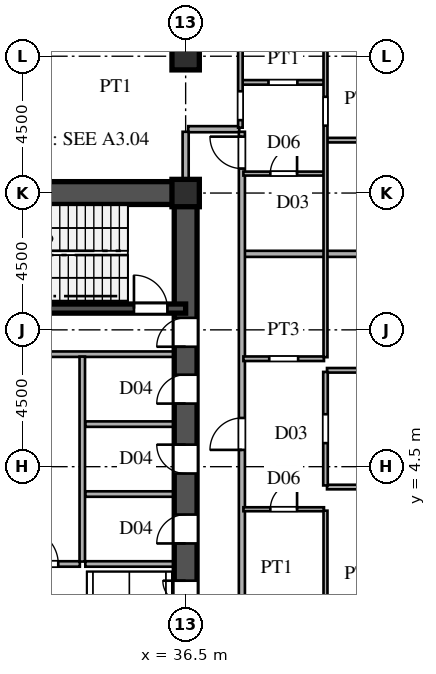
"""IFC4 building model, lengths in metres.
Left out: names, types, materials, properties, quantities, classifications, styles, units other than length and angle.
Written with IfcOpenShell. Run it as: python <this file> out.ifc"""

import sys

from ifc_helpers import new_model, si_unit, direction, frame, frame_2d, origin, origin_2d, place, context, subcontext, project, spatial, rectangle, i_section, extrude, source, transform, mapped, element, fill, save


model = new_model("IFC4")
c1 = context("Model", 3, precision=1e-05, world=origin(), true_north=direction((0.0, 1.0)))
c2 = subcontext(c1, "Body", "Model", "MODEL_VIEW")
j1 = project(units=[si_unit("LENGTHUNIT", "METRE"), si_unit("PLANEANGLEUNIT", "RADIAN")], contexts=[c1])
p1 = place(None, origin())
s1 = spatial("IfcSite", under=j1, at=p1, CompositionType="ELEMENT")
p2 = place(p1, origin())
s2 = spatial("IfcBuilding", under=s1, at=p2, CompositionType="ELEMENT")
p3 = place(p2, frame((0.0, 0.0, 36.9)))
s3 = spatial("IfcBuildingStorey", under=s2, at=p3, CompositionType="ELEMENT", Elevation=36.9)
m1 = source(origin(), c2, "Body", "SweptSolid", [
    extrude(i_section(OverallWidth=0.9, OverallDepth=0.9, WebThickness=0.036, FlangeThickness=0.055, at=origin_2d()), origin(), (0.0, 0.0, 1.0), 3.6),
])
for number, where, z_axis, x_axis in (
    (1, (36.5, 13.5, 0.0), (0.0, 0.0, 1.0), (1.0, 0.0, 0.0)),
    (2, (36.5, 18.0, 0.0), (0.0, 0.0, 1.0), (1.0, 0.0, 0.0)),
):
    element("IfcColumn", number, at=place(p3, frame(where, z_axis=z_axis, x_axis=x_axis)), inside=s3, PredefinedType="COLUMN", context=c2, shape_type="MappedRepresentation", body=[
        mapped(m1, transform((0.0, 0.0, 0.0), scale=1.0)),
    ])
p4 = place(p3, frame((27.5, 13.5, 0.0), z_axis=(0.0, 0.0, 1.0), x_axis=(1.0, 0.0, 0.0)))
e3 = element("IfcWall", 3, at=p4, inside=s3, PredefinedType="SHEAR", context=c2, shape_type="SweptSolid", body=[
    extrude(rectangle(XDim=9.0, YDim=0.75, at=frame_2d((4.5, 0.0))), origin(), (0.0, 0.0, 1.0), 3.38),
])
p5 = place(p3, frame((36.5, -1.3, 0.0), z_axis=(0.0, 0.0, 1.0), x_axis=(0.0, 1.0, 0.0)))
e4 = element("IfcWall", 4, at=p5, inside=s3, PredefinedType="SHEAR", context=c2, shape_type="SweptSolid", body=[
    extrude(rectangle(XDim=2.6, YDim=0.75, at=frame_2d((1.3, 0.0))), origin(), (0.0, 0.0, 1.0), 3.38),
])
p6 = place(p5, frame((0.55, 0.0, 0.0)))
e5 = element("IfcOpeningElement", 5, at=p6, cuts=e4, PredefinedType="OPENING", context=c2, shape_type="SweptSolid", body=[
    extrude(rectangle(XDim=1.5, YDim=2.3, at=frame_2d((0.75, 1.15))), frame((0.0, 0.385, 0.0), z_axis=(0.0, -1.0, 0.0), x_axis=(1.0, 0.0, 0.0)), (0.0, 0.0, 1.0), 0.77),
])
p7 = place(p3, frame((36.5, 8.2, 0.0), z_axis=(0.0, 0.0, 1.0), x_axis=(0.0, 1.0, 0.0)))
e6 = element("IfcWall", 6, at=p7, inside=s3, PredefinedType="SHEAR", context=c2, shape_type="SweptSolid", body=[
    extrude(rectangle(XDim=5.45, YDim=0.75, at=frame_2d((2.725, 0.0))), origin(), (0.0, 0.0, 1.0), 3.38),
])
p8 = place(p7, frame((0.245, 0.0, 0.0)))
e7 = element("IfcOpeningElement", 7, at=p8, cuts=e6, PredefinedType="OPENING", context=c2, shape_type="SweptSolid", body=[
    extrude(rectangle(XDim=0.95, YDim=2.15, at=frame_2d((0.475, 1.075))), frame((0.0, 0.385, 0.0), z_axis=(0.0, -1.0, 0.0), x_axis=(1.0, 0.0, 0.0)), (0.0, 0.0, 1.0), 0.77),
])
p9 = place(p3, frame((36.5, 1.3, 0.0), z_axis=(0.0, 0.0, 1.0), x_axis=(0.0, 1.0, 0.0)))
e8 = element("IfcWall", 8, at=p9, inside=s3, PredefinedType="SHEAR", context=c2, shape_type="SweptSolid", body=[
    extrude(rectangle(XDim=2.3, YDim=0.75, at=frame_2d((1.15, 0.0))), origin(), (0.0, 0.0, 1.0), 3.38),
])
p10 = place(p9, frame((0.675, 0.0, 0.0)))
e9 = element("IfcOpeningElement", 9, at=p10, cuts=e8, PredefinedType="OPENING", context=c2, shape_type="SweptSolid", body=[
    extrude(rectangle(XDim=0.95, YDim=2.15, at=frame_2d((0.475, 1.075))), frame((0.0, 0.385, 0.0), z_axis=(0.0, -1.0, 0.0), x_axis=(1.0, 0.0, 0.0)), (0.0, 0.0, 1.0), 0.77),
])
p11 = place(p3, frame((36.5, 3.6, 0.0), z_axis=(0.0, 0.0, 1.0), x_axis=(0.0, 1.0, 0.0)))
e10 = element("IfcWall", 10, at=p11, inside=s3, PredefinedType="SHEAR", context=c2, shape_type="SweptSolid", body=[
    extrude(rectangle(XDim=2.3, YDim=0.75, at=frame_2d((1.15, 0.0))), origin(), (0.0, 0.0, 1.0), 3.38),
])
p12 = place(p11, frame((0.675, 0.0, 0.0)))
e11 = element("IfcOpeningElement", 11, at=p12, cuts=e10, PredefinedType="OPENING", context=c2, shape_type="SweptSolid", body=[
    extrude(rectangle(XDim=0.95, YDim=2.15, at=frame_2d((0.475, 1.075))), frame((0.0, 0.385, 0.0), z_axis=(0.0, -1.0, 0.0), x_axis=(1.0, 0.0, 0.0)), (0.0, 0.0, 1.0), 0.77),
])
p13 = place(p3, frame((36.5, 5.9, 0.0), z_axis=(0.0, 0.0, 1.0), x_axis=(0.0, 1.0, 0.0)))
e12 = element("IfcWall", 12, at=p13, inside=s3, PredefinedType="SHEAR", context=c2, shape_type="SweptSolid", body=[
    extrude(rectangle(XDim=2.3, YDim=0.75, at=frame_2d((1.15, 0.0))), origin(), (0.0, 0.0, 1.0), 3.38),
])
p14 = place(p13, frame((0.675, 0.0, 0.0)))
e13 = element("IfcOpeningElement", 13, at=p14, cuts=e12, PredefinedType="OPENING", context=c2, shape_type="SweptSolid", body=[
    extrude(rectangle(XDim=0.95, YDim=2.15, at=frame_2d((0.475, 1.075))), frame((0.0, 0.385, 0.0), z_axis=(0.0, -1.0, 0.0), x_axis=(1.0, 0.0, 0.0)), (0.0, 0.0, 1.0), 0.77),
])
p15 = place(p3, frame((27.5, 9.7, 0.0), z_axis=(0.0, 0.0, 1.0), x_axis=(1.0, 0.0, 0.0)))
e14 = element("IfcWall", 14, at=p15, inside=s3, PredefinedType="SHEAR", context=c2, shape_type="SweptSolid", body=[
    extrude(rectangle(XDim=9.0, YDim=0.3, at=frame_2d((4.5, 0.0))), origin(), (0.0, 0.0, 1.0), 3.38),
])
p16 = place(p15, frame((7.3, 0.0, 0.0)))
e15 = element("IfcOpeningElement", 15, at=p16, cuts=e14, PredefinedType="OPENING", context=c2, shape_type="SweptSolid", body=[
    extrude(rectangle(XDim=1.1, YDim=2.2, at=frame_2d((0.55, 1.1))), frame((0.0, 0.16, 0.0), z_axis=(0.0, -1.0, 0.0), x_axis=(1.0, 0.0, 0.0)), (0.0, 0.0, 1.0), 0.32),
])
p17 = place(p3, frame((30.45, 8.2, 0.0), z_axis=(0.0, 0.0, 1.0), x_axis=(1.0, 0.0, 0.0)))
e16 = element("IfcWall", 16, at=p17, inside=s3, PredefinedType="PARTITIONING", context=c2, shape_type="SweptSolid", body=[
    extrude(rectangle(XDim=5.7, YDim=0.18, at=frame_2d((2.85, 0.0))), origin(), (0.0, 0.0, 1.0), 3.38),
])
p18 = place(p3, frame((33.1, 1.38, 0.0), z_axis=(0.0, 0.0, 1.0), x_axis=(0.0, 1.0, 0.0)))
e17 = element("IfcWall", 17, at=p18, inside=s3, PredefinedType="PARTITIONING", context=c2, shape_type="SweptSolid", body=[
    extrude(rectangle(XDim=6.74, YDim=0.18, at=frame_2d((3.37, 0.0))), origin(), (0.0, 0.0, 1.0), 3.38),
])
p19 = place(p3, frame((30.45, 1.3, 0.0), z_axis=(0.0, 0.0, 1.0), x_axis=(1.0, 0.0, 0.0)))
e18 = element("IfcWall", 18, at=p19, inside=s3, PredefinedType="PARTITIONING", context=c2, shape_type="SweptSolid", body=[
    extrude(rectangle(XDim=2.57, YDim=0.18, at=frame_2d((1.285, 0.0))), origin(), (0.0, 0.0, 1.0), 3.38),
])
p20 = place(p19, frame((0.71, 0.0, 0.0)))
e19 = element("IfcOpeningElement", 19, at=p20, cuts=e18, PredefinedType="OPENING", context=c2, shape_type="SweptSolid", body=[
    extrude(rectangle(XDim=1.15, YDim=2.2, at=frame_2d((0.575, 1.1))), frame((0.0, 0.1, 0.0), z_axis=(0.0, -1.0, 0.0), x_axis=(1.0, 0.0, 0.0)), (0.0, 0.0, 1.0), 0.2),
])
for number, where, z_axis, x_axis in (
    (20, (33.2, 1.3, 0.0), (0.0, 0.0, 1.0), (1.0, 0.0, 0.0)),
    (21, (33.2, 3.6, 0.0), (0.0, 0.0, 1.0), (1.0, 0.0, 0.0)),
    (22, (33.2, 5.9, 0.0), (0.0, 0.0, 1.0), (1.0, 0.0, 0.0)),
):
    element("IfcWall", number, at=place(p3, frame(where, z_axis=z_axis, x_axis=x_axis)), inside=s3, PredefinedType="PARTITIONING", context=c2, shape_type="SweptSolid", body=[
        extrude(rectangle(XDim=2.95, YDim=0.18, at=frame_2d((1.475, 0.0))), origin(), (0.0, 0.0, 1.0), 3.38),
    ])
p21 = place(p3, frame((38.4, 3.1, 0.0), z_axis=(0.0, 0.0, 1.0), x_axis=(1.0, 0.0, 0.0)))
e23 = element("IfcWall", 23, at=p21, inside=s3, PredefinedType="PARTITIONING", context=c2, shape_type="SweptSolid", body=[
    extrude(rectangle(XDim=2.65, YDim=0.13, at=frame_2d((1.325, 0.0))), origin(), (0.0, 0.0, 1.0), 3.38),
])
p22 = place(p21, frame((0.885, 0.0, 0.0)))
e24 = element("IfcOpeningElement", 24, at=p22, cuts=e23, PredefinedType="OPENING", context=c2, shape_type="SweptSolid", body=[
    extrude(rectangle(XDim=0.88, YDim=2.1, at=frame_2d((0.44, 1.05))), frame((0.0, 0.075, 0.0), z_axis=(0.0, -1.0, 0.0), x_axis=(1.0, 0.0, 0.0)), (0.0, 0.0, 1.0), 0.15),
])
p23 = place(p3, frame((41.15, 3.83, 0.0), z_axis=(0.0, 0.0, 1.0), x_axis=(1.0, 0.0, 0.0)))
e25 = element("IfcWall", 25, at=p23, inside=s3, PredefinedType="PARTITIONING", context=c2, shape_type="SweptSolid", body=[
    extrude(rectangle(XDim=31.385, YDim=0.15, at=frame_2d((15.692, 0.0))), origin(), (0.0, 0.0, 1.0), 3.38),
])
p24 = place(p23, frame((6.175, 0.0, 0.0)))
e26 = element("IfcOpeningElement", 26, at=p24, cuts=e25, PredefinedType="OPENING", context=c2, shape_type="SweptSolid", body=[
    extrude(rectangle(XDim=0.95, YDim=2.15, at=frame_2d((0.475, 1.075))), frame((0.0, 0.085, 0.0), z_axis=(0.0, -1.0, 0.0), x_axis=(1.0, 0.0, 0.0)), (0.0, 0.0, 1.0), 0.17),
])
p25 = place(p23, frame((15.725, 0.0, 0.0)))
e27 = element("IfcOpeningElement", 27, at=p25, cuts=e25, PredefinedType="OPENING", context=c2, shape_type="SweptSolid", body=[
    extrude(rectangle(XDim=0.95, YDim=2.15, at=frame_2d((0.475, 1.075))), frame((0.0, 0.085, 0.0), z_axis=(0.0, -1.0, 0.0), x_axis=(1.0, 0.0, 0.0)), (0.0, 0.0, 1.0), 0.17),
])
p26 = place(p3, frame((41.15, 7.67, 0.0), z_axis=(0.0, 0.0, 1.0), x_axis=(1.0, 0.0, 0.0)))
e28 = element("IfcWall", 28, at=p26, inside=s3, PredefinedType="PARTITIONING", context=c2, shape_type="SweptSolid", body=[
    extrude(rectangle(XDim=31.385, YDim=0.15, at=frame_2d((15.692, 0.0))), origin(), (0.0, 0.0, 1.0), 3.38),
])
p27 = place(p26, frame((6.175, 0.0, 0.0)))
e29 = element("IfcOpeningElement", 29, at=p27, cuts=e28, PredefinedType="OPENING", context=c2, shape_type="SweptSolid", body=[
    extrude(rectangle(XDim=0.95, YDim=2.15, at=frame_2d((0.475, 1.075))), frame((0.0, 0.085, 0.0), z_axis=(0.0, -1.0, 0.0), x_axis=(1.0, 0.0, 0.0)), (0.0, 0.0, 1.0), 0.17),
])
p28 = place(p26, frame((15.725, 0.0, 0.0)))
e30 = element("IfcOpeningElement", 30, at=p28, cuts=e28, PredefinedType="OPENING", context=c2, shape_type="SweptSolid", body=[
    extrude(rectangle(XDim=0.95, YDim=2.15, at=frame_2d((0.475, 1.075))), frame((0.0, 0.085, 0.0), z_axis=(0.0, -1.0, 0.0), x_axis=(1.0, 0.0, 0.0)), (0.0, 0.0, 1.0), 0.17),
])
p29 = place(p3, frame((38.4, 8.05, 0.0), z_axis=(0.0, 0.0, 1.0), x_axis=(1.0, 0.0, 0.0)))
e31 = element("IfcWall", 31, at=p29, inside=s3, PredefinedType="PARTITIONING", context=c2, shape_type="SweptSolid", body=[
    extrude(rectangle(XDim=2.65, YDim=0.15, at=frame_2d((1.325, 0.0))), origin(), (0.0, 0.0, 1.0), 3.38),
])
p30 = place(p29, frame((0.85, 0.0, 0.0)))
e32 = element("IfcOpeningElement", 32, at=p30, cuts=e31, PredefinedType="OPENING", context=c2, shape_type="SweptSolid", body=[
    extrude(rectangle(XDim=0.95, YDim=2.15, at=frame_2d((0.475, 1.075))), frame((0.0, 0.085, 0.0), z_axis=(0.0, -1.0, 0.0), x_axis=(1.0, 0.0, 0.0)), (0.0, 0.0, 1.0), 0.17),
])
p31 = place(p3, frame((38.43, 11.5, 0.0), z_axis=(0.0, 0.0, 1.0), x_axis=(1.0, 0.0, 0.0)))
e33 = element("IfcWall", 33, at=p31, inside=s3, PredefinedType="PARTITIONING", context=c2, shape_type="SweptSolid", body=[
    extrude(rectangle(XDim=30.377, YDim=0.2, at=frame_2d((15.188, 0.0))), origin(), (0.0, 0.0, 1.0), 3.38),
])
p32 = place(p3, frame((38.4, 14.14, 0.0), z_axis=(0.0, 0.0, 1.0), x_axis=(1.0, 0.0, 0.0)))
e34 = element("IfcWall", 34, at=p32, inside=s3, PredefinedType="PARTITIONING", context=c2, shape_type="SweptSolid", body=[
    extrude(rectangle(XDim=2.65, YDim=0.13, at=frame_2d((1.325, 0.0))), origin(), (0.0, 0.0, 1.0), 3.38),
])
p33 = place(p32, frame((0.885, 0.0, 0.0)))
e35 = element("IfcOpeningElement", 35, at=p33, cuts=e34, PredefinedType="OPENING", context=c2, shape_type="SweptSolid", body=[
    extrude(rectangle(XDim=0.88, YDim=2.1, at=frame_2d((0.44, 1.05))), frame((0.0, 0.075, 0.0), z_axis=(0.0, -1.0, 0.0), x_axis=(1.0, 0.0, 0.0)), (0.0, 0.0, 1.0), 0.15),
])
p34 = place(p3, frame((41.15, 15.24, 0.0), z_axis=(0.0, 0.0, 1.0), x_axis=(1.0, 0.0, 0.0)))
e36 = element("IfcWall", 36, at=p34, inside=s3, PredefinedType="PARTITIONING", context=c2, shape_type="SweptSolid", body=[
    extrude(rectangle(XDim=13.3, YDim=0.15, at=frame_2d((6.65, 0.0))), origin(), (0.0, 0.0, 1.0), 3.38),
])
p35 = place(p34, frame((6.175, 0.0, 0.0)))
e37 = element("IfcOpeningElement", 37, at=p35, cuts=e36, PredefinedType="OPENING", context=c2, shape_type="SweptSolid", body=[
    extrude(rectangle(XDim=0.95, YDim=2.15, at=frame_2d((0.475, 1.075))), frame((0.0, 0.085, 0.0), z_axis=(0.0, -1.0, 0.0), x_axis=(1.0, 0.0, 0.0)), (0.0, 0.0, 1.0), 0.17),
])
p36 = place(p3, frame((36.585, 15.6, 0.0), z_axis=(0.0, 0.0, 1.0), x_axis=(1.0, 0.0, 0.0)))
e38 = element("IfcWall", 38, at=p36, inside=s3, PredefinedType="PARTITIONING", context=c2, shape_type="SweptSolid", body=[
    extrude(rectangle(XDim=1.68, YDim=0.2, at=frame_2d((0.84, 0.0))), origin(), (0.0, 0.0, 1.0), 3.38),
])
p37 = place(p3, frame((38.35, 17.14, 0.0), z_axis=(0.0, 0.0, 1.0), x_axis=(1.0, 0.0, 0.0)))
e39 = element("IfcWall", 39, at=p37, inside=s3, PredefinedType="PARTITIONING", context=c2, shape_type="SweptSolid", body=[
    extrude(rectangle(XDim=2.7, YDim=0.15, at=frame_2d((1.35, 0.0))), origin(), (0.0, 0.0, 1.0), 3.38),
])
p38 = place(p37, frame((0.875, 0.0, 0.0)))
e40 = element("IfcOpeningElement", 40, at=p38, cuts=e39, PredefinedType="OPENING", context=c2, shape_type="SweptSolid", body=[
    extrude(rectangle(XDim=0.95, YDim=2.15, at=frame_2d((0.475, 1.075))), frame((0.0, 0.085, 0.0), z_axis=(0.0, -1.0, 0.0), x_axis=(1.0, 0.0, 0.0)), (0.0, 0.0, 1.0), 0.17),
])
p39 = place(p3, frame((36.5, 13.88, 0.0), z_axis=(0.0, 0.0, 1.0), x_axis=(0.0, 1.0, 0.0)))
e41 = element("IfcWall", 41, at=p39, inside=s3, PredefinedType="PARTITIONING", context=c2, shape_type="SweptSolid", body=[
    extrude(rectangle(XDim=1.635, YDim=0.2, at=frame_2d((0.817, 0.0))), origin(), (0.0, 0.0, 1.0), 2.68),
])
p40 = place(p3, frame((38.3, 15.65, 0.0), z_axis=(0.0, 0.0, 1.0), x_axis=(0.0, 1.0, 0.0)))
e42 = element("IfcWall", 42, at=p40, inside=s3, PredefinedType="PARTITIONING", context=c2, shape_type="SweptSolid", body=[
    extrude(rectangle(XDim=8.228, YDim=0.15, at=frame_2d((4.114, 0.0))), origin(), (0.0, 0.0, 1.0), 3.38),
])
p41 = place(p40, frame((0.248, 0.0, 0.0)))
e43 = element("IfcOpeningElement", 43, at=p41, cuts=e42, PredefinedType="OPENING", context=c2, shape_type="SweptSolid", body=[
    extrude(rectangle(XDim=0.95, YDim=2.15, at=frame_2d((0.475, 1.075))), frame((0.0, 0.085, 0.0), z_axis=(0.0, -1.0, 0.0), x_axis=(1.0, 0.0, 0.0)), (0.0, 0.0, 1.0), 0.17),
])
p42 = place(p3, frame((38.35, -15.515, 0.0), z_axis=(0.0, 0.0, 1.0), x_axis=(0.0, 1.0, 0.0)))
e44 = element("IfcWall", 44, at=p42, inside=s3, PredefinedType="PARTITIONING", context=c2, shape_type="SweptSolid", body=[
    extrude(rectangle(XDim=31.03, YDim=0.2, at=frame_2d((15.515, 0.0))), origin(), (0.0, 0.0, 1.0), 3.38),
])
p43 = place(p42, frame((0.16, 0.0, 0.0)))
e45 = element("IfcOpeningElement", 45, at=p43, cuts=e44, PredefinedType="OPENING", context=c2, shape_type="SweptSolid", body=[
    extrude(rectangle(XDim=1.05, YDim=2.25, at=frame_2d((0.525, 1.125))), frame((0.0, 0.11, 0.0), z_axis=(0.0, -1.0, 0.0), x_axis=(1.0, 0.0, 0.0)), (0.0, 0.0, 1.0), 0.22),
])
p44 = place(p42, frame((9.067, 0.0, 0.0)))
e46 = element("IfcOpeningElement", 46, at=p44, cuts=e44, PredefinedType="OPENING", context=c2, shape_type="SweptSolid", body=[
    extrude(rectangle(XDim=1.05, YDim=2.25, at=frame_2d((0.525, 1.125))), frame((0.0, 0.11, 0.0), z_axis=(0.0, -1.0, 0.0), x_axis=(1.0, 0.0, 0.0)), (0.0, 0.0, 1.0), 0.22),
])
p45 = place(p42, frame((20.567, 0.0, 0.0)))
e47 = element("IfcOpeningElement", 47, at=p45, cuts=e44, PredefinedType="OPENING", context=c2, shape_type="SweptSolid", body=[
    extrude(rectangle(XDim=1.05, YDim=2.25, at=frame_2d((0.525, 1.125))), frame((0.0, 0.11, 0.0), z_axis=(0.0, -1.0, 0.0), x_axis=(1.0, 0.0, 0.0)), (0.0, 0.0, 1.0), 0.22),
])
p46 = place(p42, frame((29.82, 0.0, 0.0)))
e48 = element("IfcOpeningElement", 48, at=p46, cuts=e44, PredefinedType="OPENING", context=c2, shape_type="SweptSolid", body=[
    extrude(rectangle(XDim=1.05, YDim=2.25, at=frame_2d((0.525, 1.125))), frame((0.0, 0.11, 0.0), z_axis=(0.0, -1.0, 0.0), x_axis=(1.0, 0.0, 0.0)), (0.0, 0.0, 1.0), 0.22),
])
p47 = place(p3, frame((41.1, -3.398, 0.0), z_axis=(0.0, 0.0, 1.0), x_axis=(0.0, 1.0, 0.0)))
e49 = element("IfcWall", 49, at=p47, inside=s3, PredefinedType="PARTITIONING", context=c2, shape_type="SweptSolid", body=[
    extrude(rectangle(XDim=6.451, YDim=0.13, at=frame_2d((3.226, 0.0))), origin(), (0.0, 0.0, 1.0), 3.38),
])
p48 = place(p3, frame((41.1, 3.883, 0.0), z_axis=(0.0, 0.0, 1.0), x_axis=(0.0, 1.0, 0.0)))
e50 = element("IfcWall", 50, at=p48, inside=s3, PredefinedType="PARTITIONING", context=c2, shape_type="SweptSolid", body=[
    extrude(rectangle(XDim=3.734, YDim=0.15, at=frame_2d((1.867, 0.0))), origin(), (0.0, 0.0, 1.0), 2.99),
])
p49 = place(p48, frame((1.392, 0.0, 0.0)))
e51 = element("IfcOpeningElement", 51, at=p49, cuts=e50, PredefinedType="OPENING", context=c2, shape_type="SweptSolid", body=[
    extrude(rectangle(XDim=0.95, YDim=2.15, at=frame_2d((0.475, 1.075))), frame((0.0, 0.085, 0.0), z_axis=(0.0, -1.0, 0.0), x_axis=(1.0, 0.0, 0.0)), (0.0, 0.0, 1.0), 0.17),
])
p50 = place(p3, frame((41.1, 8.102, 0.0), z_axis=(0.0, 0.0, 1.0), x_axis=(0.0, 1.0, 0.0)))
e52 = element("IfcWall", 52, at=p50, inside=s3, PredefinedType="PARTITIONING", context=c2, shape_type="SweptSolid", body=[
    extrude(rectangle(XDim=14.642, YDim=0.13, at=frame_2d((7.321, 0.0))), origin(), (0.0, 0.0, 1.0), 3.38),
])
p51 = place(p50, frame((7.614, 0.0, 0.0)))
e53 = element("IfcOpeningElement", 53, at=p51, cuts=e52, PredefinedType="OPENING", context=c2, shape_type="SweptSolid", body=[
    extrude(rectangle(XDim=0.95, YDim=2.15, at=frame_2d((0.475, 1.075))), frame((0.0, 0.075, 0.0), z_axis=(0.0, -1.0, 0.0), x_axis=(1.0, 0.0, 0.0)), (0.0, 0.0, 1.0), 0.15),
])
m2 = source(origin(), c2, "Body", "SweptSolid", [
    extrude(rectangle(XDim=1.5, YDim=2.3, at=frame_2d((0.75, 1.15))), frame((0.0, 0.025, 0.0), z_axis=(0.0, -1.0, 0.0), x_axis=(1.0, 0.0, 0.0)), (0.0, 0.0, 1.0), 0.05),
])
p52 = place(p6, origin())
e54 = element("IfcDoor", 54, at=p52, inside=s3, OperationType="DOUBLE_SWING_LEFT", PredefinedType="DOOR", context=c2, shape_type="MappedRepresentation", body=[
    mapped(m2, transform((0.0, 0.0, 0.0), scale=1.0)),
])
fill(e5, e54)
m3 = source(origin(), c2, "Body", "SweptSolid", [
    extrude(rectangle(XDim=0.95, YDim=2.15, at=frame_2d((0.475, 1.075))), frame((0.0, 0.025, 0.0), z_axis=(0.0, -1.0, 0.0), x_axis=(1.0, 0.0, 0.0)), (0.0, 0.0, 1.0), 0.05),
])
p53 = place(p8, origin())
e55 = element("IfcDoor", 55, at=p53, inside=s3, OperationType="SINGLE_SWING_LEFT", PredefinedType="DOOR", context=c2, shape_type="MappedRepresentation", body=[
    mapped(m3, transform((0.0, 0.0, 0.0), scale=1.0)),
])
fill(e7, e55)
p54 = place(p10, origin())
e56 = element("IfcDoor", 56, at=p54, inside=s3, OperationType="SINGLE_SWING_LEFT", PredefinedType="DOOR", context=c2, shape_type="MappedRepresentation", body=[
    mapped(m3, transform((0.0, 0.0, 0.0), scale=1.0)),
])
fill(e9, e56)
p55 = place(p12, origin())
e57 = element("IfcDoor", 57, at=p55, inside=s3, OperationType="SINGLE_SWING_RIGHT", PredefinedType="DOOR", context=c2, shape_type="MappedRepresentation", body=[
    mapped(m3, transform((0.0, 0.0, 0.0), scale=1.0)),
])
fill(e11, e57)
p56 = place(p14, origin())
e58 = element("IfcDoor", 58, at=p56, inside=s3, OperationType="SINGLE_SWING_LEFT", PredefinedType="DOOR", context=c2, shape_type="MappedRepresentation", body=[
    mapped(m3, transform((0.0, 0.0, 0.0), scale=1.0)),
])
fill(e13, e58)
m4 = source(origin(), c2, "Body", "SweptSolid", [
    extrude(rectangle(XDim=1.1, YDim=2.2, at=frame_2d((0.55, 1.1))), frame((0.0, 0.025, 0.0), z_axis=(0.0, -1.0, 0.0), x_axis=(1.0, 0.0, 0.0)), (0.0, 0.0, 1.0), 0.05),
])
p57 = place(p16, origin())
e59 = element("IfcDoor", 59, at=p57, inside=s3, OperationType="SINGLE_SWING_LEFT", PredefinedType="DOOR", context=c2, shape_type="MappedRepresentation", body=[
    mapped(m4, transform((0.0, 0.0, 0.0), scale=1.0)),
])
fill(e15, e59)
m5 = source(origin(), c2, "Body", "SweptSolid", [
    extrude(rectangle(XDim=1.15, YDim=2.2, at=frame_2d((0.575, 1.1))), frame((0.0, 0.025, 0.0), z_axis=(0.0, -1.0, 0.0), x_axis=(1.0, 0.0, 0.0)), (0.0, 0.0, 1.0), 0.05),
])
p58 = place(p20, origin())
e60 = element("IfcDoor", 60, at=p58, inside=s3, OperationType="SINGLE_SWING_LEFT", PredefinedType="DOOR", context=c2, shape_type="MappedRepresentation", body=[
    mapped(m5, transform((0.0, 0.0, 0.0), scale=1.0)),
])
fill(e19, e60)
m6 = source(origin(), c2, "Body", "SweptSolid", [
    extrude(rectangle(XDim=0.88, YDim=2.1, at=frame_2d((0.44, 1.05))), frame((0.0, 0.025, 0.0), z_axis=(0.0, -1.0, 0.0), x_axis=(1.0, 0.0, 0.0)), (0.0, 0.0, 1.0), 0.05),
])
p59 = place(p22, origin())
e61 = element("IfcDoor", 61, at=p59, inside=s3, OperationType="SINGLE_SWING_RIGHT", PredefinedType="DOOR", context=c2, shape_type="MappedRepresentation", body=[
    mapped(m6, transform((0.0, 0.0, 0.0), scale=1.0)),
])
fill(e24, e61)
p60 = place(p33, origin())
e62 = element("IfcDoor", 62, at=p60, inside=s3, OperationType="SINGLE_SWING_RIGHT", PredefinedType="DOOR", context=c2, shape_type="MappedRepresentation", body=[
    mapped(m6, transform((0.0, 0.0, 0.0), scale=1.0)),
])
fill(e35, e62)
m7 = source(origin(), c2, "Body", "SweptSolid", [
    extrude(rectangle(XDim=1.05, YDim=2.25, at=frame_2d((0.525, 1.125))), frame((0.0, 0.025, 0.0), z_axis=(0.0, -1.0, 0.0), x_axis=(1.0, 0.0, 0.0)), (0.0, 0.0, 1.0), 0.05),
])
p61 = place(p45, origin())
e63 = element("IfcDoor", 63, at=p61, inside=s3, OperationType="SINGLE_SWING_LEFT", PredefinedType="DOOR", context=c2, shape_type="MappedRepresentation", body=[
    mapped(m7, transform((0.0, 0.0, 0.0), scale=1.0)),
])
fill(e47, e63)
p62 = place(p46, origin())
e64 = element("IfcDoor", 64, at=p62, inside=s3, OperationType="SINGLE_SWING_RIGHT", PredefinedType="DOOR", context=c2, shape_type="MappedRepresentation", body=[
    mapped(m7, transform((0.0, 0.0, 0.0), scale=1.0)),
])
fill(e48, e64)
save(model, sys.argv[1])
